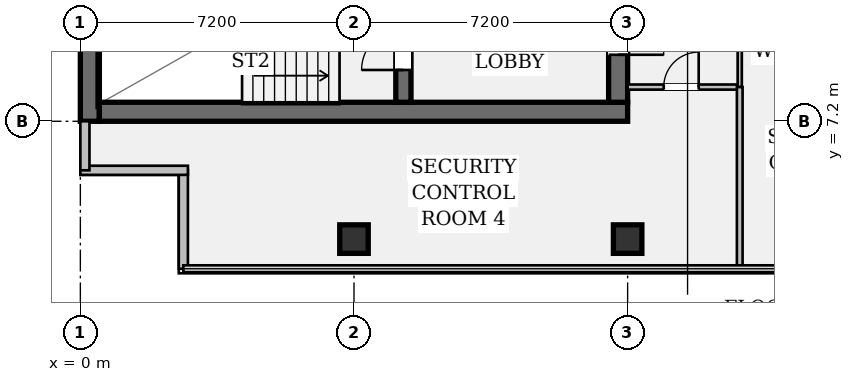
"""IFC4 building model, lengths in metres.
Left out: names, types, materials, properties, quantities, classifications, styles, units other than length and angle.
Written with IfcOpenShell. Run it as: python <this file> out.ifc"""

import sys

from ifc_helpers import new_model, si_unit, direction, frame, frame_2d, origin, origin_2d, place, context, subcontext, project, spatial, rectangle, hollow_rectangle, extrude, element, fill, save


model = new_model("IFC4")
c1 = context("Model", 3, precision=1e-05, world=origin(), true_north=direction((0.0, 1.0)))
c2 = subcontext(c1, "Body", "Model", "MODEL_VIEW")
j1 = project(units=[si_unit("LENGTHUNIT", "METRE"), si_unit("PLANEANGLEUNIT", "RADIAN")], contexts=[c1])
p1 = place(None, origin())
s1 = spatial("IfcSite", under=j1, at=p1, CompositionType="ELEMENT")
p2 = place(p1, origin())
s2 = spatial("IfcBuilding", under=s1, at=p2, CompositionType="ELEMENT")
p3 = place(p2, frame((0.0, 0.0, 201.25)))
s3 = spatial("IfcBuildingStorey", under=s2, at=p3, CompositionType="ELEMENT", Elevation=201.25)
p4 = place(p3, frame((0.25, 7.2, 0.0), z_axis=(0.0, 0.0, 1.0), x_axis=(0.0, 1.0, 0.0)))
e1 = element("IfcWall", 1, at=p4, inside=s3, PredefinedType="SHEAR", context=c2, shape_type="SweptSolid", body=[
    extrude(rectangle(XDim=28.8, YDim=0.5, at=frame_2d((14.4, 0.0))), origin(), (0.0, 0.0, 1.0), 3.24),
])
p5 = place(p3, frame((0.5, 7.45, 0.0), z_axis=(0.0, 0.0, 1.0), x_axis=(1.0, 0.0, 0.0)))
e2 = element("IfcWall", 2, at=p5, inside=s3, PredefinedType="SHEAR", context=c2, shape_type="SweptSolid", body=[
    extrude(rectangle(XDim=13.9, YDim=0.5, at=frame_2d((6.95, 0.0))), origin(), (0.0, 0.0, 1.0), 3.24),
])
p6 = place(p3, frame((14.15, 35.5, 0.0), z_axis=(0.0, 0.0, 1.0), x_axis=(0.0, -1.0, 0.0)))
e3 = element("IfcWall", 3, at=p6, inside=s3, PredefinedType="SHEAR", context=c2, shape_type="SweptSolid", body=[
    extrude(rectangle(XDim=27.8, YDim=0.5, at=frame_2d((13.9, 0.0))), origin(), (0.0, 0.0, 1.0), 3.24),
])
p7 = place(p6, frame((1.4, 0.0, 0.0)))
e4 = element("IfcOpeningElement", 4, at=p7, cuts=e3, PredefinedType="OPENING", context=c2, shape_type="SweptSolid", body=[
    extrude(rectangle(XDim=1.2, YDim=2.15, at=frame_2d((0.6, 1.075))), frame((0.0, 0.262, 0.0), z_axis=(0.0, -1.0, 0.0), x_axis=(1.0, 0.0, 0.0)), (0.0, 0.0, 1.0), 0.524),
])
p8 = place(p6, frame((25.35, 0.0, 0.0)))
e5 = element("IfcOpeningElement", 5, at=p8, cuts=e3, PredefinedType="OPENING", context=c2, shape_type="SweptSolid", body=[
    extrude(rectangle(XDim=1.2, YDim=2.15, at=frame_2d((0.6, 1.075))), frame((0.0, 0.262, 0.0), z_axis=(0.0, -1.0, 0.0), x_axis=(1.0, 0.0, 0.0)), (0.0, 0.0, 1.0), 0.524),
])
p9 = place(p6, frame((14.7, 0.0, 0.0)))
e6 = element("IfcOpeningElement", 6, at=p9, cuts=e3, PredefinedType="OPENING", context=c2, shape_type="SweptSolid", body=[
    extrude(rectangle(XDim=1.6, YDim=2.2, at=frame_2d((0.8, 1.1))), frame((0.0, 0.262, 0.0), z_axis=(0.0, -1.0, 0.0), x_axis=(1.0, 0.0, 0.0)), (0.0, 0.0, 1.0), 0.524),
])
p10 = place(p3, frame((8.5, 7.7, 0.0), z_axis=(0.0, 0.0, 1.0), x_axis=(0.0, 1.0, 0.0)))
e7 = element("IfcWall", 7, at=p10, inside=s3, PredefinedType="SHEAR", context=c2, shape_type="SweptSolid", body=[
    extrude(rectangle(XDim=3.78, YDim=0.4, at=frame_2d((1.89, 0.0))), origin(), (0.0, 0.0, 1.0), 3.24),
])
p11 = place(p10, frame((0.85, 0.0, 0.0)))
e8 = element("IfcOpeningElement", 8, at=p11, cuts=e7, PredefinedType="OPENING", context=c2, shape_type="SweptSolid", body=[
    extrude(rectangle(XDim=1.1, YDim=2.15, at=frame_2d((0.55, 1.075))), frame((0.0, 0.212, 0.0), z_axis=(0.0, -1.0, 0.0), x_axis=(1.0, 0.0, 0.0)), (0.0, 0.0, 1.0), 0.424),
])
for number, where, z_axis, x_axis in (
    (9, (7.2, 4.1, 0.0), (0.0, 0.0, 1.0), (1.0, 0.0, 0.0)),
    (10, (14.4, 4.1, 0.0), (0.0, 0.0, 1.0), (1.0, 0.0, 0.0)),
):
    element("IfcColumn", number, at=place(p3, frame(where, z_axis=z_axis, x_axis=x_axis)), inside=s3, PredefinedType="COLUMN", context=c2, shape_type="SweptSolid", body=[
        extrude(hollow_rectangle(XDim=0.75, YDim=0.75, WallThickness=0.045, at=origin_2d()), origin(), (0.0, 0.0, 1.0), 3.24),
    ])
p12 = place(p3, frame((2.71, 3.32, 0.0), z_axis=(0.0, 0.0, 1.0), x_axis=(0.0, 1.0, 0.0)))
e11 = element("IfcWall", 11, at=p12, inside=s3, PredefinedType="STANDARD", context=c2, shape_type="SweptSolid", body=[
    extrude(rectangle(XDim=2.59, YDim=0.24, at=frame_2d((1.295, 0.0))), origin(), (0.0, 0.0, 1.0), 3.24),
])
p13 = place(p3, frame((2.83, 5.91, 0.0), z_axis=(0.0, 0.0, 1.0), x_axis=(-1.0, 0.0, 0.0)))
e12 = element("IfcWall", 12, at=p13, inside=s3, PredefinedType="STANDARD", context=c2, shape_type="SweptSolid", body=[
    extrude(rectangle(XDim=2.83, YDim=0.24, at=frame_2d((1.415, 0.0))), origin(), (0.0, 0.0, 1.0), 3.24),
])
p14 = place(p3, frame((0.12, 5.91, 0.0), z_axis=(0.0, 0.0, 1.0), x_axis=(0.0, 1.0, 0.0)))
e13 = element("IfcWall", 13, at=p14, inside=s3, PredefinedType="STANDARD", context=c2, shape_type="SweptSolid", body=[
    extrude(rectangle(XDim=1.29, YDim=0.24, at=frame_2d((0.645, 0.0))), origin(), (0.0, 0.0, 1.0), 3.24),
])
p15 = place(p3, frame((14.4, 8.1, 0.0), z_axis=(0.0, 0.0, 1.0), x_axis=(1.0, 0.0, 0.0)))
e14 = element("IfcWall", 14, at=p15, inside=s3, PredefinedType="PARTITIONING", context=c2, shape_type="SweptSolid", body=[
    extrude(rectangle(XDim=2.95, YDim=0.135, at=frame_2d((1.475, 0.0))), origin(), (0.0, 0.0, 1.0), 2.808),
])
p16 = place(p15, frame((0.95, 0.0, 0.0)))
e15 = element("IfcOpeningElement", 15, at=p16, cuts=e14, PredefinedType="OPENING", context=c2, shape_type="SweptSolid", body=[
    extrude(rectangle(XDim=0.92, YDim=2.15, at=frame_2d((0.46, 1.075))), frame((0.0, 0.08, 0.0), z_axis=(0.0, -1.0, 0.0), x_axis=(1.0, 0.0, 0.0)), (0.0, 0.0, 1.0), 0.159),
])
p17 = place(p3, frame((17.35, 8.1, 0.0), z_axis=(0.0, 0.0, 1.0), x_axis=(0.0, 1.0, 0.0)))
e16 = element("IfcWall", 16, at=p17, inside=s3, PredefinedType="PARTITIONING", context=c2, shape_type="SweptSolid", body=[
    extrude(rectangle(XDim=3.2, YDim=0.11, at=frame_2d((1.6, 0.0))), origin(), (0.0, 0.0, 1.0), 3.24),
])
p18 = place(p3, frame((17.35, 3.32, 0.0), z_axis=(0.0, 0.0, 1.0), x_axis=(0.0, 1.0, 0.0)))
e17 = element("IfcWall", 17, at=p18, inside=s3, PredefinedType="PARTITIONING", context=c2, shape_type="SweptSolid", body=[
    extrude(rectangle(XDim=4.78, YDim=0.15, at=frame_2d((2.39, 0.0))), origin(), (0.0, 0.0, 1.0), 2.613),
])
p19 = place(p11, origin())
e18 = element("IfcDoor", 18, at=p19, inside=s3, OperationType="SINGLE_SWING_LEFT", PredefinedType="DOOR", context=c2, shape_type="SweptSolid", body=[
    extrude(rectangle(XDim=1.1, YDim=2.15, at=frame_2d((0.55, 1.075))), frame((0.0, 0.025, 0.0), z_axis=(0.0, -1.0, 0.0), x_axis=(1.0, 0.0, 0.0)), (0.0, 0.0, 1.0), 0.05),
])
fill(e8, e18)
p20 = place(p8, origin())
e19 = element("IfcDoor", 19, at=p20, inside=s3, OperationType="SINGLE_SWING_RIGHT", PredefinedType="DOOR", context=c2, shape_type="SweptSolid", body=[
    extrude(rectangle(XDim=1.2, YDim=2.15, at=frame_2d((0.6, 1.075))), frame((0.0, 0.025, 0.0), z_axis=(0.0, -1.0, 0.0), x_axis=(1.0, 0.0, 0.0)), (0.0, 0.0, 1.0), 0.05),
])
fill(e5, e19)
p21 = place(p16, origin())
e20 = element("IfcDoor", 20, at=p21, inside=s3, OperationType="SINGLE_SWING_RIGHT", PredefinedType="DOOR", context=c2, shape_type="SweptSolid", body=[
    extrude(rectangle(XDim=0.92, YDim=2.15, at=frame_2d((0.46, 1.075))), frame((0.0, 0.025, 0.0), z_axis=(0.0, -1.0, 0.0), x_axis=(1.0, 0.0, 0.0)), (0.0, 0.0, 1.0), 0.05),
])
fill(e15, e20)
save(model, sys.argv[1])
